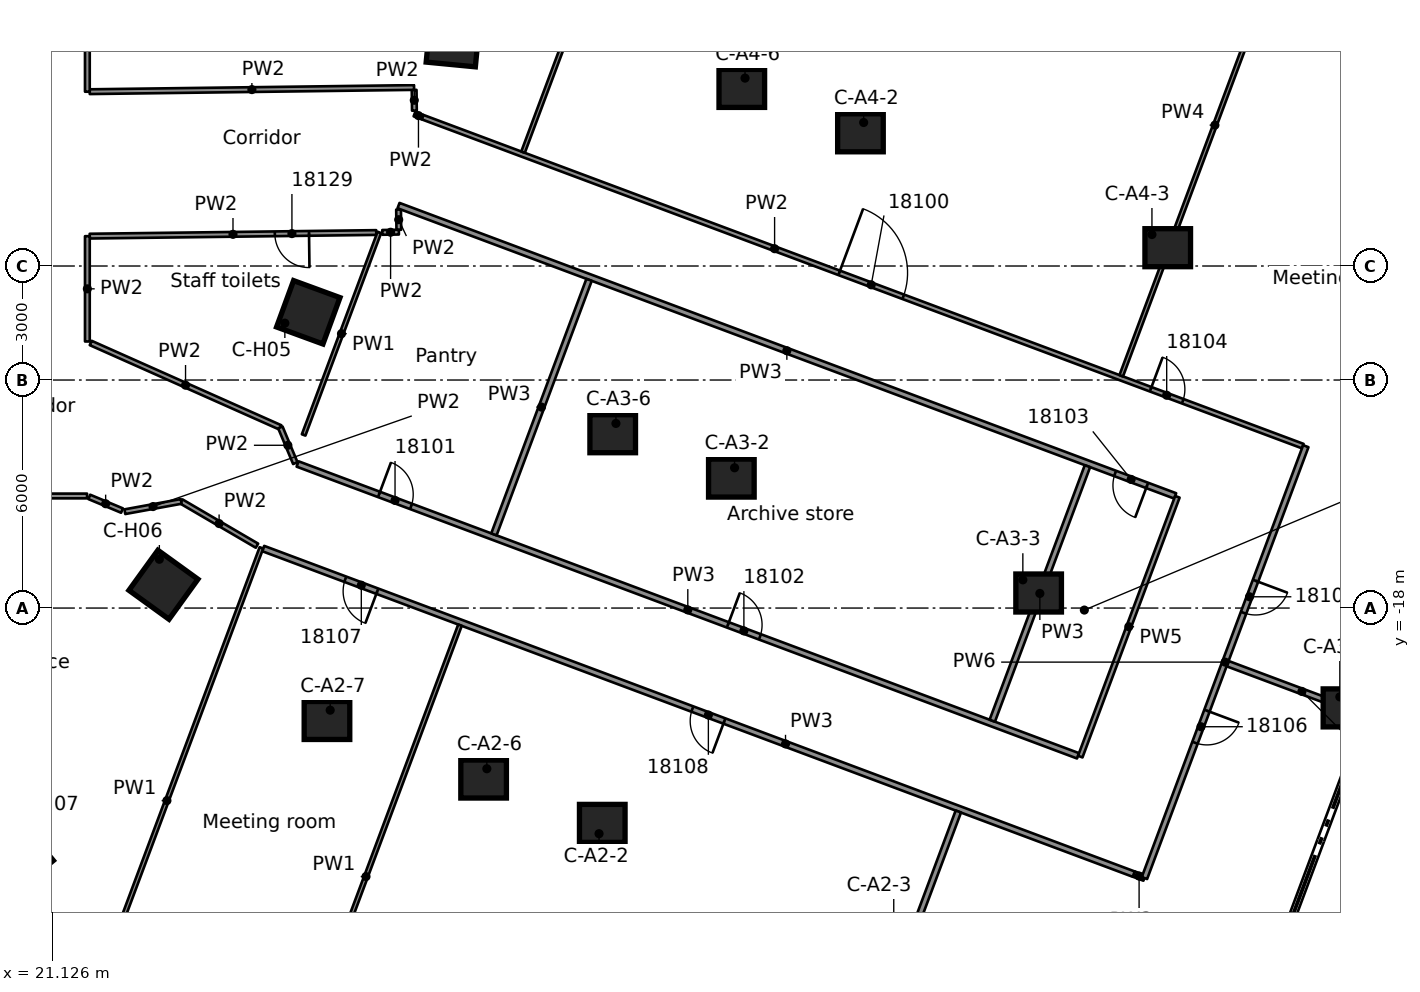
"""IFC4 building model, lengths in metres.
Left out: names, types, materials, properties, quantities, classifications, styles, units other than length and angle.
Written with IfcOpenShell. Run it as: python <this file> out.ifc"""

import sys

from ifc_helpers import new_model, si_unit, direction, frame, frame_2d, origin, origin_2d, place, context, subcontext, project, spatial, rectangle, extrude, element, fill, save


model = new_model("IFC4")
c1 = context("Model", 3, precision=1e-05, world=origin(), true_north=direction((0.0, 1.0)))
c2 = subcontext(c1, "Body", "Model", "MODEL_VIEW")
j1 = project(units=[si_unit("LENGTHUNIT", "METRE"), si_unit("PLANEANGLEUNIT", "RADIAN")], contexts=[c1])
p1 = place(None, origin())
s1 = spatial("IfcSite", under=j1, at=p1, CompositionType="ELEMENT")
p2 = place(p1, origin())
s2 = spatial("IfcBuilding", under=s1, at=p2, CompositionType="ELEMENT")
p3 = place(p2, frame((0.0, 0.0, 91.2)))
s3 = spatial("IfcBuildingStorey", under=s2, at=p3, CompositionType="ELEMENT", Elevation=91.2)
for number, where, z_axis, x_axis in (
    (1, (35.6, -23.666, 0.0), (0.0, 0.0, 1.0), (1.0, 0.0, 0.0)),
    (2, (32.478, -22.499, 0.0), (0.0, 0.0, 1.0), (1.0, 0.0, 0.0)),
    (3, (28.356, -20.958, 0.0), (0.0, 0.0, 1.0), (1.0, 0.0, 0.0)),
    (4, (38.997, -14.58, 0.0), (0.0, 0.0, 1.0), (1.0, 0.0, 0.0)),
    (5, (47.083, -17.604, 0.0), (0.0, 0.0, 1.0), (1.0, 0.0, 0.0)),
    (6, (55.17, -20.627, 0.0), (0.0, 0.0, 1.0), (1.0, 0.0, 0.0)),
    (7, (35.875, -13.413, 0.0), (0.0, 0.0, 1.0), (1.0, 0.0, 0.0)),
    (8, (42.394, -5.495, 0.0), (0.0, 0.0, 1.0), (1.0, 0.0, 0.0)),
    (9, (50.48, -8.518, 0.0), (0.0, 0.0, 1.0), (1.0, 0.0, 0.0)),
    (10, (39.272, -4.327, 0.0), (0.0, 0.0, 1.0), (1.0, 0.0, 0.0)),
):
    element("IfcColumn", number, at=place(p3, frame(where, z_axis=z_axis, x_axis=x_axis)), inside=s3, PredefinedType="COLUMN", context=c2, shape_type="SweptSolid", body=[
        extrude(rectangle(XDim=1.2, YDim=1.0, at=origin_2d()), origin(), (0.0, 0.0, 1.0), 3.5),
    ])
for number, where, z_axis, x_axis in (
    (11, (31.676, -3.05, 0.0), (0.0, 0.0, 1.0), (0.995, -0.096, 0.0)),
    (12, (27.864, -10.218, 0.0), (0.0, 0.0, 1.0), (0.939, -0.344, 0.0)),
    (13, (24.053, -17.387, 0.0), (0.0, 0.0, 1.0), (0.81, -0.586, 0.0)),
    (14, (20.241, -24.555, 0.0), (0.0, 0.0, 1.0), (0.636, -0.772, 0.0)),
):
    element("IfcColumn", number, at=place(p3, frame(where, z_axis=z_axis, x_axis=x_axis)), inside=s3, PredefinedType="COLUMN", context=c2, shape_type="SweptSolid", body=[
        extrude(rectangle(XDim=1.3, YDim=1.3, at=origin_2d()), origin(), (0.0, 0.0, 1.0), 3.5),
    ])
p4 = place(p3, frame((30.24, -7.515, 0.0), z_axis=(0.0, 0.0, 1.0), x_axis=(0.013301575401, -0.999911530132, 0.0)))
e15 = element("IfcWall", 15, at=p4, inside=s3, PredefinedType="PARTITIONING", context=c2, shape_type="SweptSolid", body=[
    extrude(rectangle(XDim=0.532, YDim=0.125, at=frame_2d((0.266, 0.0))), origin(), (0.0, 0.0, 1.0), 3.08),
])
p5 = place(p3, frame((30.65, -4.366, 0.0), z_axis=(0.0, 0.0, 1.0), x_axis=(0.012962701582, -0.999915980654, 0.0)))
e16 = element("IfcWall", 16, at=p5, inside=s3, PredefinedType="PARTITIONING", context=c2, shape_type="SweptSolid", body=[
    extrude(rectangle(XDim=0.546, YDim=0.125, at=frame_2d((0.273, 0.0))), origin(), (0.0, 0.0, 1.0), 3.08),
])
p6 = place(p3, frame((24.521, -15.194, 0.0), z_axis=(0.0, 0.0, 1.0), x_axis=(0.863352795858, -0.504600782683, 0.0)))
e17 = element("IfcWall", 17, at=p6, inside=s3, PredefinedType="PARTITIONING", context=c2, shape_type="SweptSolid", body=[
    extrude(rectangle(XDim=2.308, YDim=0.125, at=frame_2d((1.154, 0.0))), origin(), (0.0, 0.0, 1.0), 3.08),
])
p7 = place(p3, frame((22.963, -15.435, 0.0), z_axis=(0.0, 0.0, 1.0), x_axis=(-0.922689792095, 0.385543185082, 0.0)))
e18 = element("IfcWall", 18, at=p7, inside=s3, PredefinedType="PARTITIONING", context=c2, shape_type="SweptSolid", body=[
    extrude(rectangle(XDim=0.934, YDim=0.125, at=frame_2d((0.467, 0.0))), origin(), (0.0, 0.0, 1.0), 3.08),
])
p8 = place(p3, frame((27.13, -13.247, 0.0), z_axis=(0.0, 0.0, 1.0), x_axis=(-0.913542302976, 0.406743728498, 0.0)))
e19 = element("IfcWall", 19, at=p8, inside=s3, PredefinedType="PARTITIONING", context=c2, shape_type="SweptSolid", body=[
    extrude(rectangle(XDim=5.463, YDim=0.125, at=frame_2d((2.732, 0.0))), origin(), (0.0, 0.0, 1.0), 3.08),
])
p9 = place(p3, frame((49.587, -24.999, 0.0), z_axis=(0.0, 0.0, 1.0), x_axis=(0.93595848705, -0.352110366957, 0.0)))
e20 = element("IfcWall", 20, at=p9, inside=s3, PredefinedType="PARTITIONING", context=c2, shape_type="SweptSolid", body=[
    extrude(rectangle(XDim=0.298, YDim=0.15, at=frame_2d((0.149, 0.0))), origin(), (0.0, 0.0, 1.0), 3.08),
])
p10 = place(p3, frame((49.585, -25.001, 0.0), z_axis=(0.0, 0.0, 1.0), x_axis=(-0.936641004212, 0.350290778111, 0.0)))
e21 = element("IfcWall", 21, at=p10, inside=s3, PredefinedType="PARTITIONING", context=c2, shape_type="SweptSolid", body=[
    extrude(rectangle(XDim=24.457, YDim=0.15, at=frame_2d((12.228, 0.0))), origin(), (0.0, 0.0, 1.0), 3.08),
])
p11 = place(p10, frame((21.25, 0.0, 0.0)))
e22 = element("IfcOpeningElement", 22, at=p11, cuts=e21, PredefinedType="OPENING", context=c2, shape_type="SweptSolid", body=[
    extrude(rectangle(XDim=0.9, YDim=2.1, at=frame_2d((0.45, 1.05))), frame((0.0, 0.085, 0.0), z_axis=(0.0, -1.0, 0.0), x_axis=(1.0, 0.0, 0.0)), (0.0, 0.0, 1.0), 0.17),
])
p12 = place(p10, frame((11.5, 0.0, 0.0)))
e23 = element("IfcOpeningElement", 23, at=p12, cuts=e21, PredefinedType="OPENING", context=c2, shape_type="SweptSolid", body=[
    extrude(rectangle(XDim=0.9, YDim=2.1, at=frame_2d((0.45, 1.05))), frame((0.0, 0.085, 0.0), z_axis=(0.0, -1.0, 0.0), x_axis=(1.0, 0.0, 0.0)), (0.0, 0.0, 1.0), 0.17),
])
p13 = place(p3, frame((27.583, -14.209, 0.0), z_axis=(0.0, 0.0, 1.0), x_axis=(0.936658709203, -0.350243433164, 0.0)))
e24 = element("IfcWall", 24, at=p13, inside=s3, PredefinedType="PARTITIONING", context=c2, shape_type="SweptSolid", body=[
    extrude(rectangle(XDim=21.925, YDim=0.15, at=frame_2d((10.962, 0.0))), origin(), (0.0, 0.0, 1.0), 3.08),
])
p14 = place(p13, frame((2.288, 0.0, 0.0)))
e25 = element("IfcOpeningElement", 25, at=p14, cuts=e24, PredefinedType="OPENING", context=c2, shape_type="SweptSolid", body=[
    extrude(rectangle(XDim=0.9, YDim=2.1, at=frame_2d((0.45, 1.05))), frame((0.0, 0.085, 0.0), z_axis=(0.0, -1.0, 0.0), x_axis=(1.0, 0.0, 0.0)), (0.0, 0.0, 1.0), 0.17),
])
p15 = place(p13, frame((12.088, 0.0, 0.0)))
e26 = element("IfcOpeningElement", 26, at=p15, cuts=e24, PredefinedType="OPENING", context=c2, shape_type="SweptSolid", body=[
    extrude(rectangle(XDim=0.9, YDim=2.1, at=frame_2d((0.45, 1.05))), frame((0.0, 0.085, 0.0), z_axis=(0.0, -1.0, 0.0), x_axis=(1.0, 0.0, 0.0)), (0.0, 0.0, 1.0), 0.17),
])
p16 = place(p3, frame((52.056, -19.463, 0.0), z_axis=(0.0, 0.0, 1.0), x_axis=(0.936655632934, -0.350251659943, 0.0)))
e27 = element("IfcWall", 27, at=p16, inside=s3, PredefinedType="PARTITIONING", context=c2, shape_type="SweptSolid", body=[
    extrude(rectangle(XDim=4.175, YDim=0.15, at=frame_2d((2.087, 0.0))), origin(), (0.0, 0.0, 1.0), 2.469),
])
p17 = place(p3, frame((50.676, -15.049, 0.0), z_axis=(0.0, 0.0, 1.0), x_axis=(-0.936701134279, 0.350129954505, 0.0)))
e28 = element("IfcWall", 28, at=p17, inside=s3, PredefinedType="PARTITIONING", context=c2, shape_type="SweptSolid", body=[
    extrude(rectangle(XDim=21.818, YDim=0.15, at=frame_2d((10.909, 0.0))), origin(), (0.0, 0.0, 1.0), 3.08),
])
p18 = place(p17, frame((0.788, 0.0, 0.0)))
e29 = element("IfcOpeningElement", 29, at=p18, cuts=e28, PredefinedType="OPENING", context=c2, shape_type="SweptSolid", body=[
    extrude(rectangle(XDim=0.9, YDim=2.1, at=frame_2d((0.45, 1.05))), frame((0.0, 0.085, 0.0), z_axis=(0.0, -1.0, 0.0), x_axis=(1.0, 0.0, 0.0)), (0.0, 0.0, 1.0), 0.17),
])
p19 = place(p3, frame((30.869, -5.082, 0.0), z_axis=(0.0, 0.0, 1.0), x_axis=(0.936726175225, -0.350062955264, 0.0)))
e30 = element("IfcWall", 30, at=p19, inside=s3, PredefinedType="PARTITIONING", context=c2, shape_type="SweptSolid", body=[
    extrude(rectangle(XDim=24.73, YDim=0.125, at=frame_2d((12.365, 0.0))), origin(), (0.0, 0.0, 1.0), 3.08),
])
p20 = place(p19, frame((11.706, 0.0, 0.0)))
e31 = element("IfcOpeningElement", 31, at=p20, cuts=e30, PredefinedType="OPENING", context=c2, shape_type="SweptSolid", body=[
    extrude(rectangle(XDim=1.8, YDim=2.1, at=frame_2d((0.9, 1.05))), frame((0.0, 0.073, 0.0), z_axis=(0.0, -1.0, 0.0), x_axis=(1.0, 0.0, 0.0)), (0.0, 0.0, 1.0), 0.145),
])
p21 = place(p19, frame((20.457, 0.0, 0.0)))
e32 = element("IfcOpeningElement", 32, at=p21, cuts=e30, PredefinedType="OPENING", context=c2, shape_type="SweptSolid", body=[
    extrude(rectangle(XDim=0.9, YDim=2.1, at=frame_2d((0.45, 1.05))), frame((0.0, 0.073, 0.0), z_axis=(0.0, -1.0, 0.0), x_axis=(1.0, 0.0, 0.0)), (0.0, 0.0, 1.0), 0.145),
])
p22 = place(p3, frame((30.658, -5.003, 0.0), z_axis=(0.0, 0.0, 1.0), x_axis=(0.936329177569, -0.351123441588, 0.0)))
e33 = element("IfcWall", 33, at=p22, inside=s3, PredefinedType="PARTITIONING", context=c2, shape_type="SweptSolid", body=[
    extrude(rectangle(XDim=0.225, YDim=0.125, at=frame_2d((0.113, 0.0))), origin(), (0.0, 0.0, 1.0), 3.08),
])
p23 = place(p3, frame((22.043, -15.051, 0.0), z_axis=(0.0, 0.0, 1.0), x_axis=(-1.0, 0.0, 0.0)))
e34 = element("IfcWall", 34, at=p23, inside=s3, PredefinedType="PARTITIONING", context=c2, shape_type="SweptSolid", body=[
    extrude(rectangle(XDim=11.052, YDim=0.125, at=frame_2d((5.526, 0.0))), origin(), (0.0, 0.0, 1.0), 3.08),
])
p24 = place(p23, frame((2.35, 0.0, 0.0)))
e35 = element("IfcOpeningElement", 35, at=p24, cuts=e34, PredefinedType="OPENING", context=c2, shape_type="SweptSolid", body=[
    extrude(rectangle(XDim=0.9, YDim=2.1, at=frame_2d((0.45, 1.05))), frame((0.0, 0.073, 0.0), z_axis=(0.0, -1.0, 0.0), x_axis=(1.0, 0.0, 0.0)), (0.0, 0.0, 1.0), 0.145),
])
p25 = place(p3, frame((29.653, -8.119, 0.0), z_axis=(0.0, 0.0, 1.0), x_axis=(-0.999920277631, -0.012626891215, 0.0)))
e36 = element("IfcWall", 36, at=p25, inside=s3, PredefinedType="PARTITIONING", context=c2, shape_type="SweptSolid", body=[
    extrude(rectangle(XDim=7.541, YDim=0.125, at=frame_2d((3.77, 0.0))), origin(), (0.0, 0.0, 1.0), 3.08),
])
p26 = place(p25, frame((1.769, 0.0, 0.0)))
e37 = element("IfcOpeningElement", 37, at=p26, cuts=e36, PredefinedType="OPENING", context=c2, shape_type="SweptSolid", body=[
    extrude(rectangle(XDim=0.9, YDim=2.1, at=frame_2d((0.45, 1.05))), frame((0.0, 0.073, 0.0), z_axis=(0.0, -1.0, 0.0), x_axis=(1.0, 0.0, 0.0)), (0.0, 0.0, 1.0), 0.145),
])
p27 = place(p3, frame((22.113, -4.413, 0.0), z_axis=(0.0, 0.0, 1.0), x_axis=(0.999916794721, 0.012899753266, 0.0)))
e38 = element("IfcWall", 38, at=p27, inside=s3, PredefinedType="PARTITIONING", context=c2, shape_type="SweptSolid", body=[
    extrude(rectangle(XDim=8.536, YDim=0.125, at=frame_2d((4.268, 0.0))), origin(), (0.0, 0.0, 1.0), 3.08),
])
p28 = place(p3, frame((29.812, -8.115, 0.0), z_axis=(0.0, 0.0, 1.0), x_axis=(0.999902045747, 0.013996389218, 0.0)))
e39 = element("IfcWall", 39, at=p28, inside=s3, PredefinedType="PARTITIONING", context=c2, shape_type="SweptSolid", body=[
    extrude(rectangle(XDim=0.436, YDim=0.125, at=frame_2d((0.218, 0.0))), origin(), (0.0, 0.0, 1.0), 3.08),
])
p29 = place(p3, frame((23.037, -15.465, 0.0), z_axis=(0.0, 0.0, 1.0), x_axis=(0.983729770304, 0.179654499019, 0.0)))
e40 = element("IfcWall", 40, at=p29, inside=s3, PredefinedType="PARTITIONING", context=c2, shape_type="SweptSolid", body=[
    extrude(rectangle(XDim=1.509, YDim=0.125, at=frame_2d((0.754, 0.0))), origin(), (0.0, 0.0, 1.0), 3.08),
])
p30 = place(p3, frame((27.523, -14.187, 0.0), z_axis=(0.0, 0.0, 1.0), x_axis=(-0.385806130442, 0.922579877145, 0.0)))
e41 = element("IfcWall", 41, at=p30, inside=s3, PredefinedType="PARTITIONING", context=c2, shape_type="SweptSolid", body=[
    extrude(rectangle(XDim=1.019, YDim=0.125, at=frame_2d((0.509, 0.0))), origin(), (0.0, 0.0, 1.0), 3.08),
])
p31 = place(p3, frame((54.113, -13.741, 0.0), z_axis=(0.0, 0.0, 1.0), x_axis=(-0.350035835617, -0.936736309632, 0.0)))
e42 = element("IfcWall", 42, at=p31, inside=s3, PredefinedType="PARTITIONING", context=c2, shape_type="SweptSolid", body=[
    extrude(rectangle(XDim=12.13, YDim=0.15, at=frame_2d((6.065, 0.0))), origin(), (0.0, 0.0, 1.0), 2.469),
])
p32 = place(p31, frame((3.78, 0.0, 0.0)))
e43 = element("IfcOpeningElement", 43, at=p32, cuts=e42, PredefinedType="OPENING", context=c2, shape_type="SweptSolid", body=[
    extrude(rectangle(XDim=0.9, YDim=2.1, at=frame_2d((0.45, 1.05))), frame((0.0, 0.085, 0.0), z_axis=(0.0, -1.0, 0.0), x_axis=(1.0, 0.0, 0.0)), (0.0, 0.0, 1.0), 0.17),
])
p33 = place(p31, frame((7.43, 0.0, 0.0)))
e44 = element("IfcOpeningElement", 44, at=p33, cuts=e42, PredefinedType="OPENING", context=c2, shape_type="SweptSolid", body=[
    extrude(rectangle(XDim=0.9, YDim=2.1, at=frame_2d((0.45, 1.05))), frame((0.0, 0.085, 0.0), z_axis=(0.0, -1.0, 0.0), x_axis=(1.0, 0.0, 0.0)), (0.0, 0.0, 1.0), 0.17),
])
p34 = place(p3, frame((48.178, -21.909, 0.0), z_axis=(0.0, 0.0, 1.0), x_axis=(0.350170212359, 0.93668608529, 0.0)))
e45 = element("IfcWall", 45, at=p34, inside=s3, PredefinedType="PARTITIONING", context=c2, shape_type="SweptSolid", body=[
    extrude(rectangle(XDim=7.299, YDim=0.125, at=frame_2d((3.649, 0.0))), origin(), (0.0, 0.0, 1.0), 2.469),
])
p35 = place(p3, frame((40.042, -36.532, 0.0), z_axis=(0.0, 0.0, 1.0), x_axis=(0.350242868869, 0.936658920209, 0.0)))
e46 = element("IfcWall", 46, at=p35, inside=s3, PredefinedType="PARTITIONING", context=c2, shape_type="SweptSolid", body=[
    extrude(rectangle(XDim=14.07, YDim=0.15, at=frame_2d((7.035, 0.0))), origin(), (0.0, 0.0, 1.0), 3.08),
])
p36 = place(p3, frame((45.863, -20.964, 0.0), z_axis=(0.0, 0.0, 1.0), x_axis=(0.35020646324, 0.936672532481, 0.0)))
e47 = element("IfcWall", 47, at=p36, inside=s3, PredefinedType="PARTITIONING", context=c2, shape_type="SweptSolid", body=[
    extrude(rectangle(XDim=7.15, YDim=0.15, at=frame_2d((3.575, 0.0))), origin(), (0.0, 0.0, 1.0), 3.08),
])
p37 = place(p3, frame((49.256, -11.889, 0.0), z_axis=(0.0, 0.0, 1.0), x_axis=(0.35014670301, 0.936694873676, 0.0)))
e48 = element("IfcWall", 48, at=p37, inside=s3, PredefinedType="PARTITIONING", context=c2, shape_type="SweptSolid", body=[
    extrude(rectangle(XDim=14.083, YDim=0.1, at=frame_2d((7.041, 0.0))), origin(), (0.0, 0.0, 1.0), 2.445),
])
p38 = place(p3, frame((26.91, -31.68, 0.0), z_axis=(0.0, 0.0, 1.0), x_axis=(0.350179920227, 0.936682456049, 0.0)))
e49 = element("IfcWall", 49, at=p38, inside=s3, PredefinedType="PARTITIONING", context=c2, shape_type="SweptSolid", body=[
    extrude(rectangle(XDim=14.124, YDim=0.1, at=frame_2d((7.062, 0.0))), origin(), (0.0, 0.0, 1.0), 3.08),
])
p39 = place(p3, frame((32.749, -16.061, 0.0), z_axis=(0.0, 0.0, 1.0), x_axis=(0.35020646324, 0.936672532481, 0.0)))
e50 = element("IfcWall", 50, at=p39, inside=s3, PredefinedType="PARTITIONING", context=c2, shape_type="SweptSolid", body=[
    extrude(rectangle(XDim=7.15, YDim=0.15, at=frame_2d((3.575, 0.0))), origin(), (0.0, 0.0, 1.0), 3.08),
])
p40 = place(p3, frame((33.516, -6.004, 0.0), z_axis=(0.0, 0.0, 1.0), x_axis=(0.350228055147, 0.936664459338, 0.0)))
e51 = element("IfcWall", 51, at=p40, inside=s3, PredefinedType="PARTITIONING", context=c2, shape_type="SweptSolid", body=[
    extrude(rectangle(XDim=14.136, YDim=0.1, at=frame_2d((7.068, 0.0))), origin(), (0.0, 0.0, 1.0), 3.08),
])
p41 = place(p3, frame((21.658, -29.717, 0.0), z_axis=(0.0, 0.0, 1.0), x_axis=(0.350213245568, 0.936669996652, 0.0)))
e52 = element("IfcWall", 52, at=p41, inside=s3, PredefinedType="PARTITIONING", context=c2, shape_type="SweptSolid", body=[
    extrude(rectangle(XDim=14.2, YDim=0.1, at=frame_2d((7.1, 0.0))), origin(), (0.0, 0.0, 1.0), 3.08),
])
p42 = place(p3, frame((27.742, -13.445, 0.0), z_axis=(0.0, 0.0, 1.0), x_axis=(0.350126252707, 0.936702517967, 0.0)))
e53 = element("IfcWall", 53, at=p42, inside=s3, PredefinedType="PARTITIONING", context=c2, shape_type="SweptSolid", body=[
    extrude(rectangle(XDim=5.689, YDim=0.1, at=frame_2d((2.845, 0.0))), origin(), (0.0, 0.0, 1.0), 3.08),
])
p43 = place(p3, frame((22.051, -10.986, 0.0), z_axis=(0.0, 0.0, 1.0), x_axis=(0.0, 1.0, 0.0)))
e54 = element("IfcWall", 54, at=p43, inside=s3, PredefinedType="PARTITIONING", context=c2, shape_type="SweptSolid", body=[
    extrude(rectangle(XDim=2.771, YDim=0.125, at=frame_2d((1.385, 0.0))), origin(), (0.0, 0.0, 1.0), 3.08),
])
p44 = place(p3, frame((22.051, 15.05, 0.0), z_axis=(0.0, 0.0, 1.0), x_axis=(0.0, -1.0, 0.0)))
e55 = element("IfcWall", 55, at=p44, inside=s3, PredefinedType="PARTITIONING", context=c2, shape_type="SweptSolid", body=[
    extrude(rectangle(XDim=19.464, YDim=0.125, at=frame_2d((9.732, 0.0))), origin(), (0.0, 0.0, 1.0), 3.08),
])
p45 = place(p44, frame((10.4, 0.0, 0.0)))
e56 = element("IfcOpeningElement", 56, at=p45, cuts=e55, PredefinedType="OPENING", context=c2, shape_type="SweptSolid", body=[
    extrude(rectangle(XDim=1.8, YDim=2.1, at=frame_2d((0.9, 1.05))), frame((0.0, 0.073, 0.0), z_axis=(0.0, -1.0, 0.0), x_axis=(1.0, 0.0, 0.0)), (0.0, 0.0, 1.0), 0.145),
])
p46 = place(p20, origin())
e57 = element("IfcDoor", 57, at=p46, inside=s3, OperationType="DOUBLE_DOOR_SINGLE_SWING", PredefinedType="DOOR", context=c2, shape_type="SweptSolid", body=[
    extrude(rectangle(XDim=1.8, YDim=2.1, at=frame_2d((0.9, 1.05))), frame((0.0, 0.025, 0.0), z_axis=(0.0, -1.0, 0.0), x_axis=(1.0, 0.0, 0.0)), (0.0, 0.0, 1.0), 0.05),
])
fill(e31, e57)
p47 = place(p14, origin())
e58 = element("IfcDoor", 58, at=p47, inside=s3, OperationType="SINGLE_SWING_LEFT", PredefinedType="DOOR", context=c2, shape_type="SweptSolid", body=[
    extrude(rectangle(XDim=0.9, YDim=2.1, at=frame_2d((0.45, 1.05))), frame((0.0, 0.025, 0.0), z_axis=(0.0, -1.0, 0.0), x_axis=(1.0, 0.0, 0.0)), (0.0, 0.0, 1.0), 0.05),
])
fill(e25, e58)
p48 = place(p15, origin())
e59 = element("IfcDoor", 59, at=p48, inside=s3, OperationType="SINGLE_SWING_RIGHT", PredefinedType="DOOR", context=c2, shape_type="SweptSolid", body=[
    extrude(rectangle(XDim=0.9, YDim=2.1, at=frame_2d((0.45, 1.05))), frame((0.0, 0.025, 0.0), z_axis=(0.0, -1.0, 0.0), x_axis=(1.0, 0.0, 0.0)), (0.0, 0.0, 1.0), 0.05),
])
fill(e26, e59)
p49 = place(p18, origin())
e60 = element("IfcDoor", 60, at=p49, inside=s3, OperationType="SINGLE_SWING_LEFT", PredefinedType="DOOR", context=c2, shape_type="SweptSolid", body=[
    extrude(rectangle(XDim=0.9, YDim=2.1, at=frame_2d((0.45, 1.05))), frame((0.0, 0.025, 0.0), z_axis=(0.0, -1.0, 0.0), x_axis=(1.0, 0.0, 0.0)), (0.0, 0.0, 1.0), 0.05),
])
fill(e29, e60)
p50 = place(p21, origin())
e61 = element("IfcDoor", 61, at=p50, inside=s3, OperationType="SINGLE_SWING_RIGHT", PredefinedType="DOOR", context=c2, shape_type="SweptSolid", body=[
    extrude(rectangle(XDim=0.9, YDim=2.1, at=frame_2d((0.45, 1.05))), frame((0.0, 0.025, 0.0), z_axis=(0.0, -1.0, 0.0), x_axis=(1.0, 0.0, 0.0)), (0.0, 0.0, 1.0), 0.05),
])
fill(e32, e61)
p51 = place(p32, origin())
e62 = element("IfcDoor", 62, at=p51, inside=s3, OperationType="SINGLE_SWING_LEFT", PredefinedType="DOOR", context=c2, shape_type="SweptSolid", body=[
    extrude(rectangle(XDim=0.9, YDim=2.1, at=frame_2d((0.45, 1.05))), frame((0.0, 0.025, 0.0), z_axis=(0.0, -1.0, 0.0), x_axis=(1.0, 0.0, 0.0)), (0.0, 0.0, 1.0), 0.05),
])
fill(e43, e62)
p52 = place(p33, origin())
e63 = element("IfcDoor", 63, at=p52, inside=s3, OperationType="SINGLE_SWING_RIGHT", PredefinedType="DOOR", context=c2, shape_type="SweptSolid", body=[
    extrude(rectangle(XDim=0.9, YDim=2.1, at=frame_2d((0.45, 1.05))), frame((0.0, 0.025, 0.0), z_axis=(0.0, -1.0, 0.0), x_axis=(1.0, 0.0, 0.0)), (0.0, 0.0, 1.0), 0.05),
])
fill(e44, e63)
p53 = place(p11, origin())
e64 = element("IfcDoor", 64, at=p53, inside=s3, OperationType="SINGLE_SWING_RIGHT", PredefinedType="DOOR", context=c2, shape_type="SweptSolid", body=[
    extrude(rectangle(XDim=0.9, YDim=2.1, at=frame_2d((0.45, 1.05))), frame((0.0, 0.025, 0.0), z_axis=(0.0, -1.0, 0.0), x_axis=(1.0, 0.0, 0.0)), (0.0, 0.0, 1.0), 0.05),
])
fill(e22, e64)
p54 = place(p12, origin())
e65 = element("IfcDoor", 65, at=p54, inside=s3, OperationType="SINGLE_SWING_LEFT", PredefinedType="DOOR", context=c2, shape_type="SweptSolid", body=[
    extrude(rectangle(XDim=0.9, YDim=2.1, at=frame_2d((0.45, 1.05))), frame((0.0, 0.025, 0.0), z_axis=(0.0, -1.0, 0.0), x_axis=(1.0, 0.0, 0.0)), (0.0, 0.0, 1.0), 0.05),
])
fill(e23, e65)
p55 = place(p26, origin())
e66 = element("IfcDoor", 66, at=p55, inside=s3, OperationType="SINGLE_SWING_LEFT", PredefinedType="DOOR", context=c2, shape_type="SweptSolid", body=[
    extrude(rectangle(XDim=0.9, YDim=2.1, at=frame_2d((0.45, 1.05))), frame((0.0, 0.025, 0.0), z_axis=(0.0, -1.0, 0.0), x_axis=(1.0, 0.0, 0.0)), (0.0, 0.0, 1.0), 0.05),
])
fill(e37, e66)
save(model, sys.argv[1])
